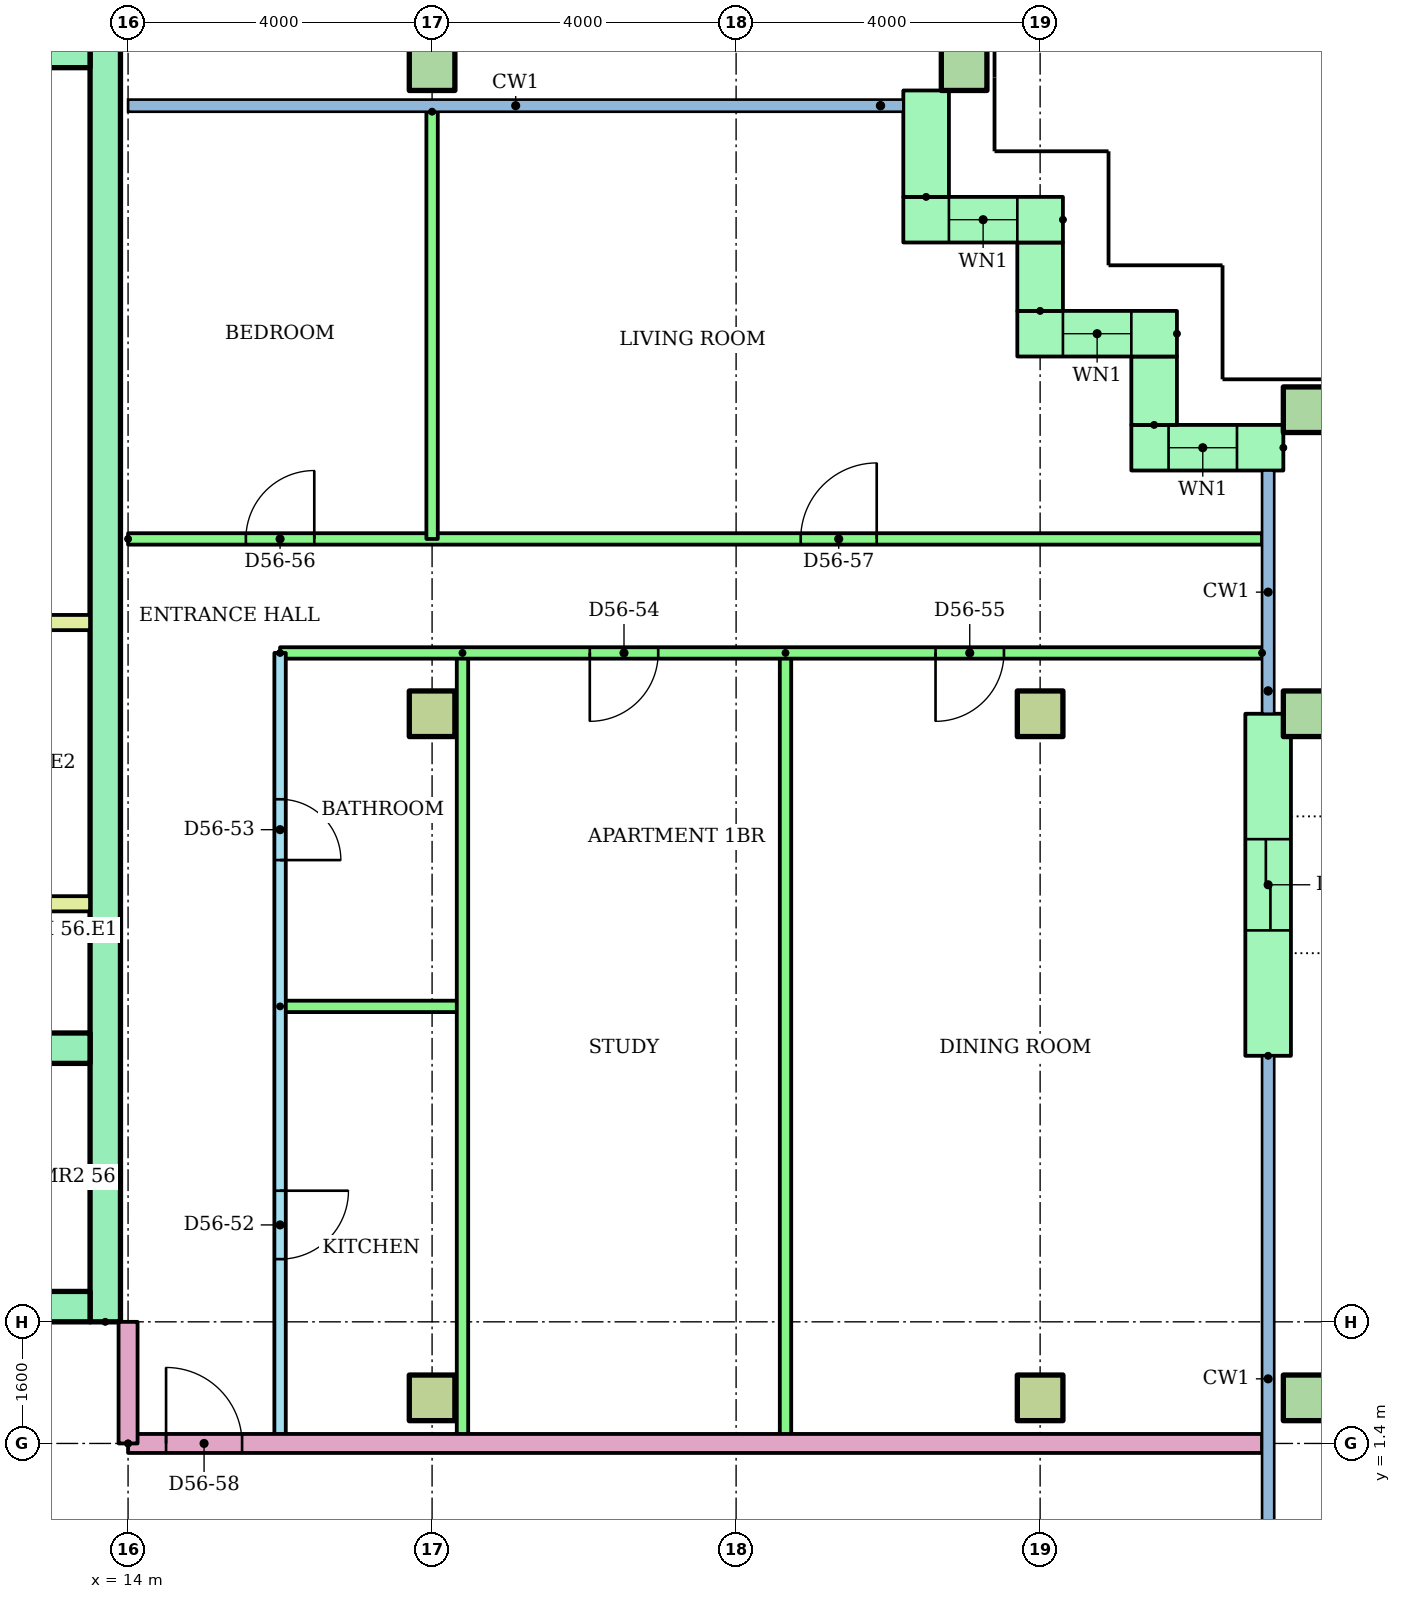
"""IFC4 building model, lengths in metres.
Left out: names, types, materials, properties, quantities, classifications, styles, units other than length and angle.
Written with IfcOpenShell. Run it as: python <this file> out.ifc"""

import sys

from ifc_helpers import new_model, si_unit, direction, frame, frame_2d, origin, origin_2d, place, context, subcontext, project, spatial, rectangle, hollow_rectangle, extrude, element, fill, save


model = new_model("IFC4")
c1 = context("Model", 3, precision=1e-05, world=origin(), true_north=direction((0.0, 1.0)))
c2 = subcontext(c1, "Body", "Model", "MODEL_VIEW")
j1 = project(units=[si_unit("LENGTHUNIT", "METRE"), si_unit("PLANEANGLEUNIT", "RADIAN")], contexts=[c1])
p1 = place(None, origin())
s1 = spatial("IfcSite", under=j1, at=p1, CompositionType="ELEMENT")
p2 = place(p1, origin())
s2 = spatial("IfcBuilding", under=s1, at=p2, CompositionType="ELEMENT")
p3 = place(p2, frame((0.0, 0.0, 217.2)))
s3 = spatial("IfcBuildingStorey", under=s2, at=p3, CompositionType="ELEMENT", Elevation=217.2)
for number, where in (
    (1, (18.0, 2.0, 0.0)),
    (2, (26.0, 2.0, 0.0)),
):
    element("IfcColumn", number, at=place(p3, frame(where)), inside=s3, PredefinedType="COLUMN", context=c2, shape_type="SweptSolid", body=[
        extrude(rectangle(XDim=0.6, YDim=0.6, at=origin_2d()), origin(), (0.0, 0.0, 1.0), 3.2),
    ])
p4 = place(p3, frame((29.5, 2.0, 0.0)))
e3 = element("IfcColumn", 3, at=p4, inside=s3, PredefinedType="COLUMN", context=c2, shape_type="SweptSolid", body=[
    extrude(hollow_rectangle(XDim=0.6, YDim=0.6, WallThickness=0.03, at=origin_2d()), origin(), (0.0, 0.0, 1.0), 3.2),
])
for number, where in (
    (4, (18.0, 11.0, 0.0)),
    (5, (26.0, 11.0, 0.0)),
):
    element("IfcColumn", number, at=place(p3, frame(where)), inside=s3, PredefinedType="COLUMN", context=c2, shape_type="SweptSolid", body=[
        extrude(rectangle(XDim=0.6, YDim=0.6, at=origin_2d()), origin(), (0.0, 0.0, 1.0), 3.2),
    ])
for number, where in (
    (6, (29.5, 11.0, 0.0)),
    (7, (29.5, 15.0, 0.0)),
    (8, (18.0, 19.5, 0.0)),
    (9, (25.0, 19.5, 0.0)),
):
    element("IfcColumn", number, at=place(p3, frame(where)), inside=s3, PredefinedType="COLUMN", context=c2, shape_type="SweptSolid", body=[
        extrude(hollow_rectangle(XDim=0.6, YDim=0.6, WallThickness=0.03, at=origin_2d()), origin(), (0.0, 0.0, 1.0), 3.2),
    ])
p5 = place(p3, frame((29.2, 14.5, 0.0), z_axis=(0.0, 0.0, 1.0), x_axis=(-1.0, 0.0, 0.0)))
e10 = element("IfcWall", 10, at=p5, inside=s3, PredefinedType="STANDARD", context=c2, shape_type="SweptSolid", body=[
    extrude(rectangle(XDim=2.0, YDim=0.6, at=frame_2d((1.0, 0.0))), origin(), (0.0, 0.0, 1.0), 2.92),
])
p6 = place(p5, frame((0.61, 0.0, 0.9)))
e11 = element("IfcOpeningElement", 11, at=p6, cuts=e10, PredefinedType="OPENING", context=c2, shape_type="SweptSolid", body=[
    extrude(rectangle(XDim=0.9, YDim=1.5, at=frame_2d((0.45, 0.75))), frame((0.0, 0.31, 0.0), z_axis=(0.0, -1.0, 0.0), x_axis=(1.0, 0.0, 0.0)), (0.0, 0.0, 1.0), 0.62),
])
p7 = place(p3, frame((27.5, 14.8, 0.0), z_axis=(0.0, 0.0, 1.0), x_axis=(0.0, 1.0, 0.0)))
e12 = element("IfcWall", 12, at=p7, inside=s3, PredefinedType="STANDARD", context=c2, shape_type="SweptSolid", body=[
    extrude(rectangle(XDim=0.9, YDim=0.6, at=frame_2d((0.45, 0.0))), origin(), (0.0, 0.0, 1.0), 2.92),
])
p8 = place(p3, frame((27.8, 16.0, 0.0), z_axis=(0.0, 0.0, 1.0), x_axis=(-1.0, 0.0, 0.0)))
e13 = element("IfcWall", 13, at=p8, inside=s3, PredefinedType="STANDARD", context=c2, shape_type="SweptSolid", body=[
    extrude(rectangle(XDim=2.1, YDim=0.6, at=frame_2d((1.05, 0.0))), origin(), (0.0, 0.0, 1.0), 2.92),
])
p9 = place(p8, frame((0.6, 0.0, 0.9)))
e14 = element("IfcOpeningElement", 14, at=p9, cuts=e13, PredefinedType="OPENING", context=c2, shape_type="SweptSolid", body=[
    extrude(rectangle(XDim=0.9, YDim=1.5, at=frame_2d((0.45, 0.75))), frame((0.0, 0.31, 0.0), z_axis=(0.0, -1.0, 0.0), x_axis=(1.0, 0.0, 0.0)), (0.0, 0.0, 1.0), 0.62),
])
p10 = place(p3, frame((26.0, 16.3, 0.0), z_axis=(0.0, 0.0, 1.0), x_axis=(0.0, 1.0, 0.0)))
e15 = element("IfcWall", 15, at=p10, inside=s3, PredefinedType="STANDARD", context=c2, shape_type="SweptSolid", body=[
    extrude(rectangle(XDim=0.9, YDim=0.6, at=frame_2d((0.45, 0.0))), origin(), (0.0, 0.0, 1.0), 2.92),
])
p11 = place(p3, frame((26.3, 17.5, 0.0), z_axis=(0.0, 0.0, 1.0), x_axis=(-1.0, 0.0, 0.0)))
e16 = element("IfcWall", 16, at=p11, inside=s3, PredefinedType="STANDARD", context=c2, shape_type="SweptSolid", body=[
    extrude(rectangle(XDim=2.1, YDim=0.6, at=frame_2d((1.05, 0.0))), origin(), (0.0, 0.0, 1.0), 2.92),
])
p12 = place(p11, frame((0.6, 0.0, 0.9)))
e17 = element("IfcOpeningElement", 17, at=p12, cuts=e16, PredefinedType="OPENING", context=c2, shape_type="SweptSolid", body=[
    extrude(rectangle(XDim=0.9, YDim=1.5, at=frame_2d((0.45, 0.75))), frame((0.0, 0.31, 0.0), z_axis=(0.0, -1.0, 0.0), x_axis=(1.0, 0.0, 0.0)), (0.0, 0.0, 1.0), 0.62),
])
p13 = place(p3, frame((24.5, 17.8, 0.0), z_axis=(0.0, 0.0, 1.0), x_axis=(0.0, 1.0, 0.0)))
e18 = element("IfcWall", 18, at=p13, inside=s3, PredefinedType="STANDARD", context=c2, shape_type="SweptSolid", body=[
    extrude(rectangle(XDim=1.4, YDim=0.6, at=frame_2d((0.7, 0.0))), origin(), (0.0, 0.0, 1.0), 2.92),
])
p14 = place(p3, frame((29.0, 6.5, 0.0), z_axis=(0.0, 0.0, 1.0), x_axis=(0.0, 1.0, 0.0)))
e19 = element("IfcWall", 19, at=p14, inside=s3, PredefinedType="STANDARD", context=c2, shape_type="SweptSolid", body=[
    extrude(rectangle(XDim=4.5, YDim=0.6, at=frame_2d((2.25, 0.0))), origin(), (0.0, 0.0, 1.0), 2.92),
])
p15 = place(p14, frame((1.65, 0.0, 0.0)))
e20 = element("IfcOpeningElement", 20, at=p15, cuts=e19, PredefinedType="OPENING", context=c2, shape_type="SweptSolid", body=[
    extrude(rectangle(XDim=1.2, YDim=2.1, at=frame_2d((0.6, 1.05))), frame((0.0, 0.31, 0.0), z_axis=(0.0, -1.0, 0.0), x_axis=(1.0, 0.0, 0.0)), (0.0, 0.0, 1.0), 0.62),
])
p16 = place(p3, frame((13.7, 3.0, 0.0), z_axis=(0.0, 0.0, 1.0), x_axis=(0.0, 1.0, 0.0)))
e21 = element("IfcWall", 21, at=p16, inside=s3, PredefinedType="SHEAR", context=c2, shape_type="SweptSolid", body=[
    extrude(rectangle(XDim=17.0, YDim=0.4, at=frame_2d((8.5, 0.0))), origin(), (0.0, 0.0, 1.0), 2.92),
])
p17 = place(p3, frame((-13.5, 19.7, 0.0)))
e22 = element("IfcWall", 22, at=p17, inside=s3, PredefinedType="SHEAR", context=c2, shape_type="SweptSolid", body=[
    extrude(rectangle(XDim=27.0, YDim=0.4, at=frame_2d((13.5, 0.0))), origin(), (0.0, 0.0, 1.0), 2.92),
])
p18 = place(p3, frame((-13.5, 3.2, 0.0)))
e23 = element("IfcWall", 23, at=p18, inside=s3, PredefinedType="SHEAR", context=c2, shape_type="SweptSolid", body=[
    extrude(rectangle(XDim=27.0, YDim=0.4, at=frame_2d((13.5, 0.0))), origin(), (0.0, 0.0, 1.0), 2.92),
])
p19 = place(p18, frame((22.083, 0.0, 0.0)))
e24 = element("IfcOpeningElement", 24, at=p19, cuts=e23, PredefinedType="OPENING", context=c2, shape_type="SweptSolid", body=[
    extrude(rectangle(XDim=1.1, YDim=2.1, at=frame_2d((0.55, 1.05))), frame((0.0, 0.21, 0.0), z_axis=(0.0, -1.0, 0.0), x_axis=(1.0, 0.0, 0.0)), (0.0, 0.0, 1.0), 0.42),
])
p20 = place(p18, frame((25.128, 0.0, 0.0)))
e25 = element("IfcOpeningElement", 25, at=p20, cuts=e23, PredefinedType="OPENING", context=c2, shape_type="SweptSolid", body=[
    extrude(rectangle(XDim=1.1, YDim=2.1, at=frame_2d((0.55, 1.05))), frame((0.0, 0.21, 0.0), z_axis=(0.0, -1.0, 0.0), x_axis=(1.0, 0.0, 0.0)), (0.0, 0.0, 1.0), 0.42),
])
p21 = place(p18, frame((12.6, 0.0, 0.0)))
e26 = element("IfcOpeningElement", 26, at=p21, cuts=e23, PredefinedType="OPENING", context=c2, shape_type="SweptSolid", body=[
    extrude(rectangle(XDim=1.8, YDim=2.1, at=frame_2d((0.9, 1.05))), frame((0.0, 0.21, 0.0), z_axis=(0.0, -1.0, 0.0), x_axis=(1.0, 0.0, 0.0)), (0.0, 0.0, 1.0), 0.42),
])
p22 = place(p3, frame((1.522, 6.6, 0.0)))
e27 = element("IfcWall", 27, at=p22, inside=s3, PredefinedType="SHEAR", context=c2, shape_type="SweptSolid", body=[
    extrude(rectangle(XDim=11.978, YDim=0.4, at=frame_2d((5.989, 0.0))), origin(), (0.0, 0.0, 1.0), 2.92),
])
p23 = place(p22, frame((1.022, 0.0, 0.0)))
e28 = element("IfcOpeningElement", 28, at=p23, cuts=e27, PredefinedType="OPENING", context=c2, shape_type="SweptSolid", body=[
    extrude(rectangle(XDim=1.0, YDim=2.1, at=frame_2d((0.5, 1.05))), frame((0.0, 0.21, 0.0), z_axis=(0.0, -1.0, 0.0), x_axis=(1.0, 0.0, 0.0)), (0.0, 0.0, 1.0), 0.42),
])
p24 = place(p22, frame((4.067, 0.0, 0.0)))
e29 = element("IfcOpeningElement", 29, at=p24, cuts=e27, PredefinedType="OPENING", context=c2, shape_type="SweptSolid", body=[
    extrude(rectangle(XDim=1.0, YDim=2.1, at=frame_2d((0.5, 1.05))), frame((0.0, 0.21, 0.0), z_axis=(0.0, -1.0, 0.0), x_axis=(1.0, 0.0, 0.0)), (0.0, 0.0, 1.0), 0.42),
])
for number, where in (
    (30, (9.6, 8.5, 0.0)),
    (31, (9.6, 12.2, 0.0)),
):
    element("IfcWall", number, at=place(p3, frame(where)), inside=s3, PredefinedType="PARTITIONING", context=c2, shape_type="SweptSolid", body=[
        extrude(rectangle(XDim=3.9, YDim=0.2, at=frame_2d((1.95, 0.0))), origin(), (0.0, 0.0, 1.0), 2.92),
    ])
p25 = place(p3, frame((16.0, 11.8, 0.0), z_axis=(0.0, 0.0, 1.0), x_axis=(0.0, -1.0, 0.0)))
e32 = element("IfcWall", 32, at=p25, inside=s3, PredefinedType="PARTITIONING", context=c2, shape_type="SweptSolid", body=[
    extrude(rectangle(XDim=10.4, YDim=0.15, at=frame_2d((5.2, 0.0))), origin(), (0.0, 0.0, 1.0), 2.4),
])
p26 = place(p25, frame((7.075, 0.0, 0.0)))
e33 = element("IfcOpeningElement", 33, at=p26, cuts=e32, PredefinedType="OPENING", context=c2, shape_type="SweptSolid", body=[
    extrude(rectangle(XDim=0.9, YDim=2.1, at=frame_2d((0.45, 1.05))), frame((0.0, 0.085, 0.0), z_axis=(0.0, -1.0, 0.0), x_axis=(1.0, 0.0, 0.0)), (0.0, 0.0, 1.0), 0.17),
])
p27 = place(p25, frame((1.925, 0.0, 0.0)))
e34 = element("IfcOpeningElement", 34, at=p27, cuts=e32, PredefinedType="OPENING", context=c2, shape_type="SweptSolid", body=[
    extrude(rectangle(XDim=0.8, YDim=2.1, at=frame_2d((0.4, 1.05))), frame((0.0, 0.085, 0.0), z_axis=(0.0, -1.0, 0.0), x_axis=(1.0, 0.0, 0.0)), (0.0, 0.0, 1.0), 0.17),
])
p28 = place(p3, frame((16.0, 7.15, 0.0)))
e35 = element("IfcWall", 35, at=p28, inside=s3, PredefinedType="PARTITIONING", context=c2, shape_type="SweptSolid", body=[
    extrude(rectangle(XDim=2.4, YDim=0.15, at=frame_2d((1.2, 0.0))), origin(), (0.0, 0.0, 1.0), 2.4),
])
for number, where, z_axis, x_axis in (
    (36, (18.4, 11.8, 0.0), (0.0, 0.0, 1.0), (0.0, -1.0, 0.0)),
    (37, (22.65, 11.8, 0.0), (0.0, 0.0, 1.0), (0.0, -1.0, 0.0)),
):
    element("IfcWall", number, at=place(p3, frame(where, z_axis=z_axis, x_axis=x_axis)), inside=s3, PredefinedType="PARTITIONING", context=c2, shape_type="SweptSolid", body=[
        extrude(rectangle(XDim=10.4, YDim=0.15, at=frame_2d((5.2, 0.0))), origin(), (0.0, 0.0, 1.0), 2.4),
    ])
p29 = place(p3, frame((28.92, 11.8, 0.0), z_axis=(0.0, 0.0, 1.0), x_axis=(-1.0, 0.0, 0.0)))
e38 = element("IfcWall", 38, at=p29, inside=s3, PredefinedType="PARTITIONING", context=c2, shape_type="SweptSolid", body=[
    extrude(rectangle(XDim=12.92, YDim=0.15, at=frame_2d((6.46, 0.0))), origin(), (0.0, 0.0, 1.0), 2.4),
])
p30 = place(p29, frame((7.945, 0.0, 0.0)))
e39 = element("IfcOpeningElement", 39, at=p30, cuts=e38, PredefinedType="OPENING", context=c2, shape_type="SweptSolid", body=[
    extrude(rectangle(XDim=0.9, YDim=2.1, at=frame_2d((0.45, 1.05))), frame((0.0, 0.085, 0.0), z_axis=(0.0, -1.0, 0.0), x_axis=(1.0, 0.0, 0.0)), (0.0, 0.0, 1.0), 0.17),
])
p31 = place(p29, frame((3.396, 0.0, 0.0)))
e40 = element("IfcOpeningElement", 40, at=p31, cuts=e38, PredefinedType="OPENING", context=c2, shape_type="SweptSolid", body=[
    extrude(rectangle(XDim=0.9, YDim=2.1, at=frame_2d((0.45, 1.05))), frame((0.0, 0.085, 0.0), z_axis=(0.0, -1.0, 0.0), x_axis=(1.0, 0.0, 0.0)), (0.0, 0.0, 1.0), 0.17),
])
p32 = place(p3, frame((14.0, 13.3, 0.0)))
e41 = element("IfcWall", 41, at=p32, inside=s3, PredefinedType="PARTITIONING", context=c2, shape_type="SweptSolid", body=[
    extrude(rectangle(XDim=14.92, YDim=0.15, at=frame_2d((7.46, 0.0))), origin(), (0.0, 0.0, 1.0), 2.4),
])
p33 = place(p32, frame((1.55, 0.0, 0.0)))
e42 = element("IfcOpeningElement", 42, at=p33, cuts=e41, PredefinedType="OPENING", context=c2, shape_type="SweptSolid", body=[
    extrude(rectangle(XDim=0.9, YDim=2.1, at=frame_2d((0.45, 1.05))), frame((0.0, 0.085, 0.0), z_axis=(0.0, -1.0, 0.0), x_axis=(1.0, 0.0, 0.0)), (0.0, 0.0, 1.0), 0.17),
])
p34 = place(p32, frame((8.85, 0.0, 0.0)))
e43 = element("IfcOpeningElement", 43, at=p34, cuts=e41, PredefinedType="OPENING", context=c2, shape_type="SweptSolid", body=[
    extrude(rectangle(XDim=1.0, YDim=2.1, at=frame_2d((0.5, 1.05))), frame((0.0, 0.085, 0.0), z_axis=(0.0, -1.0, 0.0), x_axis=(1.0, 0.0, 0.0)), (0.0, 0.0, 1.0), 0.17),
])
p35 = place(p3, frame((18.0, 18.921, 0.0), z_axis=(0.0, 0.0, 1.0), x_axis=(0.0, -1.0, 0.0)))
e44 = element("IfcWall", 44, at=p35, inside=s3, PredefinedType="PARTITIONING", context=c2, shape_type="SweptSolid", body=[
    extrude(rectangle(XDim=5.621, YDim=0.15, at=frame_2d((2.811, 0.0))), origin(), (0.0, 0.0, 1.0), 2.4),
])
p36 = place(p3, frame((14.0, 1.4, 0.0)))
e45 = element("IfcWall", 45, at=p36, inside=s3, PredefinedType="PARTITIONING", context=c2, shape_type="SweptSolid", body=[
    extrude(rectangle(XDim=14.92, YDim=0.25, at=frame_2d((7.46, 0.0))), origin(), (0.0, 0.0, 1.0), 2.4),
])
p37 = place(p36, frame((0.5, 0.0, 0.0)))
e46 = element("IfcOpeningElement", 46, at=p37, cuts=e45, PredefinedType="OPENING", context=c2, shape_type="SweptSolid", body=[
    extrude(rectangle(XDim=1.0, YDim=2.1, at=frame_2d((0.5, 1.05))), frame((0.0, 0.135, 0.0), z_axis=(0.0, -1.0, 0.0), x_axis=(1.0, 0.0, 0.0)), (0.0, 0.0, 1.0), 0.27),
])
p38 = place(p3, frame((14.0, 1.4, 0.0), z_axis=(0.0, 0.0, 1.0), x_axis=(0.0, 1.0, 0.0)))
e47 = element("IfcWall", 47, at=p38, inside=s3, PredefinedType="PARTITIONING", context=c2, shape_type="SweptSolid", body=[
    extrude(rectangle(XDim=1.6, YDim=0.25, at=frame_2d((0.8, 0.0))), origin(), (0.0, 0.0, 1.0), 2.4),
])
p39 = place(p6, origin())
e48 = element("IfcWindow", 48, at=p39, inside=s3, PartitioningType="SINGLE_PANEL", PredefinedType="WINDOW", context=c2, shape_type="SweptSolid", body=[
    extrude(rectangle(XDim=0.9, YDim=1.5, at=frame_2d((0.45, 0.75))), frame((0.0, 0.03, 0.0), z_axis=(0.0, -1.0, 0.0), x_axis=(1.0, 0.0, 0.0)), (0.0, 0.0, 1.0), 0.06),
])
fill(e11, e48)
p40 = place(p9, origin())
e49 = element("IfcWindow", 49, at=p40, inside=s3, PartitioningType="SINGLE_PANEL", PredefinedType="WINDOW", context=c2, shape_type="SweptSolid", body=[
    extrude(rectangle(XDim=0.9, YDim=1.5, at=frame_2d((0.45, 0.75))), frame((0.0, 0.03, 0.0), z_axis=(0.0, -1.0, 0.0), x_axis=(1.0, 0.0, 0.0)), (0.0, 0.0, 1.0), 0.06),
])
fill(e14, e49)
p41 = place(p12, origin())
e50 = element("IfcWindow", 50, at=p41, inside=s3, PartitioningType="SINGLE_PANEL", PredefinedType="WINDOW", context=c2, shape_type="SweptSolid", body=[
    extrude(rectangle(XDim=0.9, YDim=1.5, at=frame_2d((0.45, 0.75))), frame((0.0, 0.03, 0.0), z_axis=(0.0, -1.0, 0.0), x_axis=(1.0, 0.0, 0.0)), (0.0, 0.0, 1.0), 0.06),
])
fill(e17, e50)
p42 = place(p26, origin())
e51 = element("IfcDoor", 51, at=p42, inside=s3, OperationType="SINGLE_SWING_LEFT", PredefinedType="DOOR", context=c2, shape_type="SweptSolid", body=[
    extrude(rectangle(XDim=0.9, YDim=2.1, at=frame_2d((0.45, 1.05))), frame((0.0, 0.025, 0.0), z_axis=(0.0, -1.0, 0.0), x_axis=(1.0, 0.0, 0.0)), (0.0, 0.0, 1.0), 0.05),
])
fill(e33, e51)
p43 = place(p27, origin())
e52 = element("IfcDoor", 52, at=p43, inside=s3, OperationType="SINGLE_SWING_RIGHT", PredefinedType="DOOR", context=c2, shape_type="SweptSolid", body=[
    extrude(rectangle(XDim=0.8, YDim=2.1, at=frame_2d((0.4, 1.05))), frame((0.0, 0.025, 0.0), z_axis=(0.0, -1.0, 0.0), x_axis=(1.0, 0.0, 0.0)), (0.0, 0.0, 1.0), 0.05),
])
fill(e34, e52)
p44 = place(p30, origin())
e53 = element("IfcDoor", 53, at=p44, inside=s3, OperationType="SINGLE_SWING_RIGHT", PredefinedType="DOOR", context=c2, shape_type="SweptSolid", body=[
    extrude(rectangle(XDim=0.9, YDim=2.1, at=frame_2d((0.45, 1.05))), frame((0.0, 0.025, 0.0), z_axis=(0.0, -1.0, 0.0), x_axis=(1.0, 0.0, 0.0)), (0.0, 0.0, 1.0), 0.05),
])
fill(e39, e53)
p45 = place(p31, origin())
e54 = element("IfcDoor", 54, at=p45, inside=s3, OperationType="SINGLE_SWING_RIGHT", PredefinedType="DOOR", context=c2, shape_type="SweptSolid", body=[
    extrude(rectangle(XDim=0.9, YDim=2.1, at=frame_2d((0.45, 1.05))), frame((0.0, 0.025, 0.0), z_axis=(0.0, -1.0, 0.0), x_axis=(1.0, 0.0, 0.0)), (0.0, 0.0, 1.0), 0.05),
])
fill(e40, e54)
p46 = place(p33, origin())
e55 = element("IfcDoor", 55, at=p46, inside=s3, OperationType="SINGLE_SWING_RIGHT", PredefinedType="DOOR", context=c2, shape_type="SweptSolid", body=[
    extrude(rectangle(XDim=0.9, YDim=2.1, at=frame_2d((0.45, 1.05))), frame((0.0, 0.025, 0.0), z_axis=(0.0, -1.0, 0.0), x_axis=(1.0, 0.0, 0.0)), (0.0, 0.0, 1.0), 0.05),
])
fill(e42, e55)
p47 = place(p34, origin())
e56 = element("IfcDoor", 56, at=p47, inside=s3, OperationType="SINGLE_SWING_RIGHT", PredefinedType="DOOR", context=c2, shape_type="SweptSolid", body=[
    extrude(rectangle(XDim=1.0, YDim=2.1, at=frame_2d((0.5, 1.05))), frame((0.0, 0.025, 0.0), z_axis=(0.0, -1.0, 0.0), x_axis=(1.0, 0.0, 0.0)), (0.0, 0.0, 1.0), 0.05),
])
fill(e43, e56)
p48 = place(p37, origin())
e57 = element("IfcDoor", 57, at=p48, inside=s3, OperationType="SINGLE_SWING_LEFT", PredefinedType="DOOR", context=c2, shape_type="SweptSolid", body=[
    extrude(rectangle(XDim=1.0, YDim=2.1, at=frame_2d((0.5, 1.05))), frame((0.0, 0.025, 0.0), z_axis=(0.0, -1.0, 0.0), x_axis=(1.0, 0.0, 0.0)), (0.0, 0.0, 1.0), 0.05),
])
fill(e46, e57)
p49 = place(p15, origin())
e58 = element("IfcDoor", 58, at=p49, inside=s3, OperationType="SLIDING_TO_LEFT", PredefinedType="DOOR", context=c2, shape_type="SweptSolid", body=[
    extrude(rectangle(XDim=1.2, YDim=2.1, at=frame_2d((0.6, 1.05))), frame((0.0, 0.025, 0.0), z_axis=(0.0, -1.0, 0.0), x_axis=(1.0, 0.0, 0.0)), (0.0, 0.0, 1.0), 0.05),
])
fill(e20, e58)
save(model, sys.argv[1])
